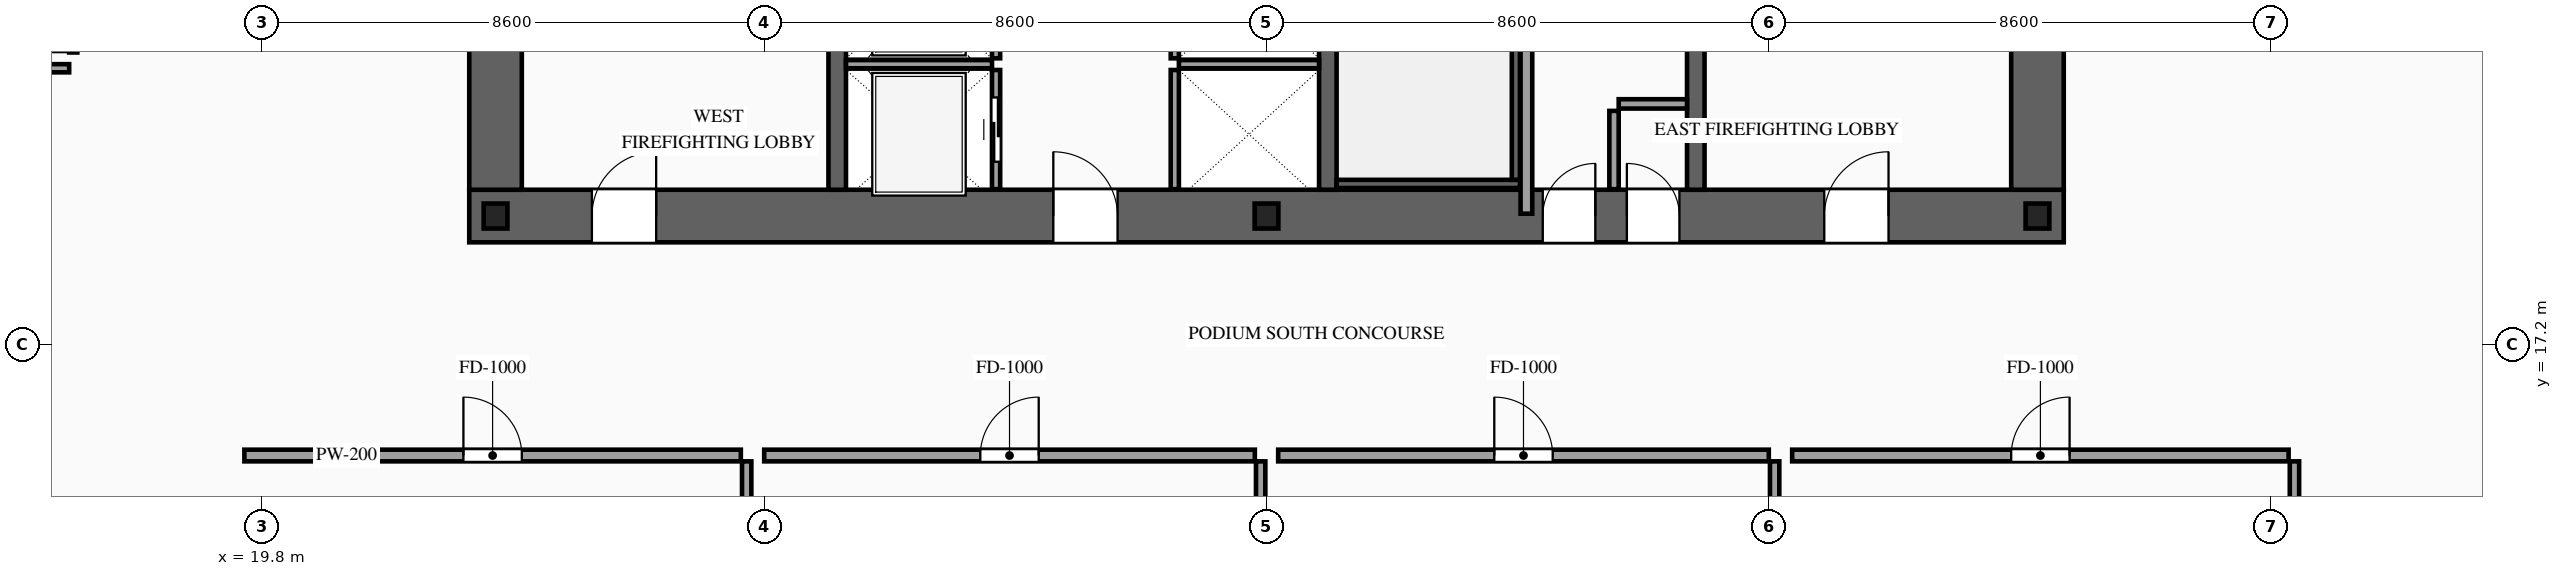
"""IFC4 building model, lengths in metres.
Left out: names, types, materials, properties, quantities, classifications, styles, units other than length and angle.
Written with IfcOpenShell. Run it as: python <this file> out.ifc"""

import sys

from ifc_helpers import new_model, si_unit, direction, frame, frame_2d, origin, origin_2d, place, context, subcontext, project, spatial, rectangle, i_section, extrude, source, transform, mapped, element, fill, save


model = new_model("IFC4")
c1 = context("Model", 3, precision=1e-05, world=origin(), true_north=direction((0.0, 1.0)))
c2 = subcontext(c1, "Body", "Model", "MODEL_VIEW")
j1 = project(units=[si_unit("LENGTHUNIT", "METRE"), si_unit("PLANEANGLEUNIT", "RADIAN")], contexts=[c1])
p1 = place(None, origin())
s1 = spatial("IfcSite", under=j1, at=p1, CompositionType="ELEMENT")
p2 = place(p1, origin())
s2 = spatial("IfcBuilding", under=s1, at=p2, CompositionType="ELEMENT")
p3 = place(p2, frame((0.0, 0.0, 25.8)))
s3 = spatial("IfcBuildingStorey", under=s2, at=p3, CompositionType="ELEMENT", Elevation=25.8)
p4 = place(p3, frame((23.35, 19.4, 0.0), z_axis=(0.0, 0.0, 1.0), x_axis=(1.0, 0.0, 0.0)))
e1 = element("IfcWall", 1, at=p4, inside=s3, PredefinedType="SHEAR", context=c2, shape_type="SweptSolid", body=[
    extrude(rectangle(XDim=27.3, YDim=0.9, at=frame_2d((13.65, 0.0))), origin(), (0.0, 0.0, 1.0), 4.8),
])
p5 = place(p4, frame((2.1, 0.0, 0.0)))
e2 = element("IfcOpeningElement", 2, at=p5, cuts=e1, PredefinedType="OPENING", context=c2, shape_type="SweptSolid", body=[
    extrude(rectangle(XDim=1.1, YDim=2.2, at=frame_2d((0.55, 1.1))), frame((0.0, 0.465, 0.0), z_axis=(0.0, -1.0, 0.0), x_axis=(1.0, 0.0, 0.0)), (0.0, 0.0, 1.0), 0.93),
])
p6 = place(p4, frame((10.0, 0.0, 0.0)))
e3 = element("IfcOpeningElement", 3, at=p6, cuts=e1, PredefinedType="OPENING", context=c2, shape_type="SweptSolid", body=[
    extrude(rectangle(XDim=1.1, YDim=2.2, at=frame_2d((0.55, 1.1))), frame((0.0, 0.465, 0.0), z_axis=(0.0, -1.0, 0.0), x_axis=(1.0, 0.0, 0.0)), (0.0, 0.0, 1.0), 0.93),
])
p7 = place(p4, frame((23.2, 0.0, 0.0)))
e4 = element("IfcOpeningElement", 4, at=p7, cuts=e1, PredefinedType="OPENING", context=c2, shape_type="SweptSolid", body=[
    extrude(rectangle(XDim=1.1, YDim=2.2, at=frame_2d((0.55, 1.1))), frame((0.0, 0.465, 0.0), z_axis=(0.0, -1.0, 0.0), x_axis=(1.0, 0.0, 0.0)), (0.0, 0.0, 1.0), 0.93),
])
p8 = place(p4, frame((19.82, 0.0, 0.0)))
e5 = element("IfcOpeningElement", 5, at=p8, cuts=e1, PredefinedType="OPENING", context=c2, shape_type="SweptSolid", body=[
    extrude(rectangle(XDim=0.9, YDim=2.15, at=frame_2d((0.45, 1.075))), frame((0.0, 0.465, 0.0), z_axis=(0.0, -1.0, 0.0), x_axis=(1.0, 0.0, 0.0)), (0.0, 0.0, 1.0), 0.93),
])
p9 = place(p4, frame((18.38, 0.0, 0.0)))
e6 = element("IfcOpeningElement", 6, at=p9, cuts=e1, PredefinedType="OPENING", context=c2, shape_type="SweptSolid", body=[
    extrude(rectangle(XDim=0.9, YDim=2.15, at=frame_2d((0.45, 1.075))), frame((0.0, 0.465, 0.0), z_axis=(0.0, -1.0, 0.0), x_axis=(1.0, 0.0, 0.0)), (0.0, 0.0, 1.0), 0.93),
])
m1 = source(origin(), c2, "Body", "SweptSolid", [
    extrude(rectangle(XDim=11.9, YDim=0.9, at=frame_2d((5.95, 0.0))), origin(), (0.0, 0.0, 1.0), 4.8),
])
for number, where, z_axis, x_axis in (
    (7, (23.8, 19.85, 0.0), (0.0, 0.0, 1.0), (0.0, 1.0, 0.0)),
    (8, (50.2, 19.85, 0.0), (0.0, 0.0, 1.0), (0.0, 1.0, 0.0)),
):
    element("IfcWall", number, at=place(p3, frame(where, z_axis=z_axis, x_axis=x_axis)), inside=s3, PredefinedType="SHEAR", context=c2, shape_type="MappedRepresentation", body=[
        mapped(m1, transform((0.0, 0.0, 0.0), scale=1.0)),
    ])
m2 = source(origin(), c2, "Body", "SweptSolid", [
    extrude(rectangle(XDim=11.9, YDim=0.3, at=frame_2d((5.95, 0.0))), origin(), (0.0, 0.0, 1.0), 4.8),
])
for number, where, z_axis, x_axis in (
    (9, (29.65, 19.85, 0.0), (0.0, 0.0, 1.0), (0.0, 1.0, 0.0)),
    (10, (38.05, 19.85, 0.0), (0.0, 0.0, 1.0), (0.0, 1.0, 0.0)),
    (11, (44.35, 19.85, 0.0), (0.0, 0.0, 1.0), (0.0, 1.0, 0.0)),
):
    element("IfcWall", number, at=place(p3, frame(where, z_axis=z_axis, x_axis=x_axis)), inside=s3, PredefinedType="SOLIDWALL", context=c2, shape_type="MappedRepresentation", body=[
        mapped(m2, transform((0.0, 0.0, 0.0), scale=1.0)),
    ])
m3 = source(origin(), c2, "Body", "SweptSolid", [
    extrude(i_section(OverallWidth=0.407, OverallDepth=0.428, WebThickness=0.02, FlangeThickness=0.035, at=origin_2d()), origin(), (0.0, 0.0, 1.0), 4.8),
])
for number, where, z_axis, x_axis in (
    (12, (23.8, 19.4, 0.0), (0.0, 0.0, 1.0), (1.0, 0.0, 0.0)),
    (13, (37.0, 19.4, 0.0), (0.0, 0.0, 1.0), (1.0, 0.0, 0.0)),
    (14, (50.2, 19.4, 0.0), (0.0, 0.0, 1.0), (1.0, 0.0, 0.0)),
):
    element("IfcColumn", number, at=place(p3, frame(where, z_axis=z_axis, x_axis=x_axis)), inside=s3, PredefinedType="COLUMN", context=c2, shape_type="MappedRepresentation", body=[
        mapped(m3, transform((0.0, 0.0, 0.0), scale=1.0)),
    ])
p10 = place(p3, frame((32.37, 19.86, 0.0), z_axis=(0.0, 0.0, 1.0), x_axis=(0.0, 1.0, 0.0)))
e15 = element("IfcWall", 15, at=p10, inside=s3, PredefinedType="SOLIDWALL", context=c2, shape_type="SweptSolid", body=[
    extrude(rectangle(XDim=2.04, YDim=0.14, at=frame_2d((1.02, 0.0))), origin(), (0.0, 0.0, 1.0), 4.5),
])
p11 = place(p10, frame((0.47, 0.0, 0.0)))
e16 = element("IfcOpeningElement", 16, at=p11, cuts=e15, PredefinedType="OPENING", context=c2, shape_type="SweptSolid", body=[
    extrude(rectangle(XDim=1.1, YDim=2.2, at=frame_2d((0.55, 1.1))), frame((0.0, 0.085, 0.0), z_axis=(0.0, -1.0, 0.0), x_axis=(1.0, 0.0, 0.0)), (0.0, 0.0, 1.0), 0.17),
])
m4 = source(origin(), c2, "Body", "SweptSolid", [
    extrude(rectangle(XDim=2.5, YDim=0.14, at=frame_2d((1.25, 0.0))), origin(), (0.0, 0.0, 1.0), 4.5),
])
p12 = place(p3, frame((29.8, 22.0, 0.0), z_axis=(0.0, 0.0, 1.0), x_axis=(1.0, 0.0, 0.0)))
e17 = element("IfcWall", 17, at=p12, inside=s3, PredefinedType="SOLIDWALL", context=c2, shape_type="MappedRepresentation", body=[
    mapped(m4, transform((0.0, 0.0, 0.0), scale=1.0)),
])
p13 = place(p3, frame((32.37, 22.1, 0.0), z_axis=(0.0, 0.0, 1.0), x_axis=(0.0, 1.0, 0.0)))
e18 = element("IfcWall", 18, at=p13, inside=s3, PredefinedType="SOLIDWALL", context=c2, shape_type="SweptSolid", body=[
    extrude(rectangle(XDim=2.2, YDim=0.14, at=frame_2d((1.1, 0.0))), origin(), (0.0, 0.0, 1.0), 4.5),
])
p14 = place(p13, frame((0.55, 0.0, 0.0)))
e19 = element("IfcOpeningElement", 19, at=p14, cuts=e18, PredefinedType="OPENING", context=c2, shape_type="SweptSolid", body=[
    extrude(rectangle(XDim=1.1, YDim=2.2, at=frame_2d((0.55, 1.1))), frame((0.0, 0.085, 0.0), z_axis=(0.0, -1.0, 0.0), x_axis=(1.0, 0.0, 0.0)), (0.0, 0.0, 1.0), 0.17),
])
m5 = source(origin(), c2, "Body", "SweptSolid", [
    extrude(rectangle(XDim=2.04, YDim=0.14, at=frame_2d((1.02, 0.0))), origin(), (0.0, 0.0, 1.0), 4.5),
])
p15 = place(p3, frame((35.43, 19.86, 0.0), z_axis=(0.0, 0.0, 1.0), x_axis=(0.0, 1.0, 0.0)))
e20 = element("IfcWall", 20, at=p15, inside=s3, PredefinedType="SOLIDWALL", context=c2, shape_type="MappedRepresentation", body=[
    mapped(m5, transform((0.0, 0.0, 0.0), scale=1.0)),
])
m6 = source(origin(), c2, "Body", "SweptSolid", [
    extrude(rectangle(XDim=2.4, YDim=0.14, at=frame_2d((1.2, 0.0))), origin(), (0.0, 0.0, 1.0), 4.5),
])
p16 = place(p3, frame((35.5, 22.0, 0.0), z_axis=(0.0, 0.0, 1.0), x_axis=(1.0, 0.0, 0.0)))
e21 = element("IfcWall", 21, at=p16, inside=s3, PredefinedType="SOLIDWALL", context=c2, shape_type="MappedRepresentation", body=[
    mapped(m6, transform((0.0, 0.0, 0.0), scale=1.0)),
])
m7 = source(origin(), c2, "Body", "SweptSolid", [
    extrude(rectangle(XDim=2.2, YDim=0.14, at=frame_2d((1.1, 0.0))), origin(), (0.0, 0.0, 1.0), 4.5),
])
p17 = place(p3, frame((35.43, 22.1, 0.0), z_axis=(0.0, 0.0, 1.0), x_axis=(0.0, 1.0, 0.0)))
e22 = element("IfcWall", 22, at=p17, inside=s3, PredefinedType="SOLIDWALL", context=c2, shape_type="MappedRepresentation", body=[
    mapped(m7, transform((0.0, 0.0, 0.0), scale=1.0)),
])
m8 = source(origin(), c2, "Body", "SweptSolid", [
    extrude(rectangle(XDim=2.3, YDim=0.14, at=frame_2d((1.15, 0.0))), origin(), (0.0, 0.0, 1.0), 4.5),
])
p18 = place(p3, frame((14.2, 21.93, 0.0), z_axis=(0.0, 0.0, 1.0), x_axis=(1.0, 0.0, 0.0)))
e23 = element("IfcWall", 23, at=p18, inside=s3, PredefinedType="SOLIDWALL", context=c2, shape_type="MappedRepresentation", body=[
    mapped(m8, transform((0.0, 0.0, 0.0), scale=1.0)),
])
m9 = source(origin(), c2, "Body", "SweptSolid", [
    extrude(rectangle(XDim=3.14, YDim=0.14, at=frame_2d((1.57, 0.0))), origin(), (0.0, 0.0, 1.0), 4.5),
])
p19 = place(p3, frame((38.2, 19.95, 0.0), z_axis=(0.0, 0.0, 1.0), x_axis=(1.0, 0.0, 0.0)))
e24 = element("IfcWall", 24, at=p19, inside=s3, PredefinedType="SOLIDWALL", context=c2, shape_type="MappedRepresentation", body=[
    mapped(m9, transform((0.0, 0.0, 0.0), scale=1.0)),
])
m10 = source(origin(), c2, "Body", "SweptSolid", [
    extrude(rectangle(XDim=8.94, YDim=0.14, at=frame_2d((4.47, 0.0))), origin(), (0.0, 0.0, 1.0), 4.5),
])
p20 = place(p3, frame((41.27, 20.02, 0.0), z_axis=(0.0, 0.0, 1.0), x_axis=(0.0, 1.0, 0.0)))
e25 = element("IfcWall", 25, at=p20, inside=s3, PredefinedType="SOLIDWALL", context=c2, shape_type="MappedRepresentation", body=[
    mapped(m10, transform((0.0, 0.0, 0.0), scale=1.0)),
])
m11 = source(origin(), c2, "Body", "SweptSolid", [
    extrude(rectangle(XDim=1.34, YDim=0.16, at=frame_2d((0.67, 0.0))), origin(), (0.0, 0.0, 1.0), 4.5),
])
p21 = place(p3, frame((42.95, 19.86, 0.0), z_axis=(0.0, 0.0, 1.0), x_axis=(0.0, 1.0, 0.0)))
e26 = element("IfcWall", 26, at=p21, inside=s3, PredefinedType="PARTITIONING", context=c2, shape_type="MappedRepresentation", body=[
    mapped(m11, transform((0.0, 0.0, 0.0), scale=1.0)),
])
m12 = source(origin(), c2, "Body", "SweptSolid", [
    extrude(rectangle(XDim=1.17, YDim=0.16, at=frame_2d((0.585, 0.0))), origin(), (0.0, 0.0, 1.0), 4.5),
])
p22 = place(p3, frame((43.03, 21.32, 0.0), z_axis=(0.0, 0.0, 1.0), x_axis=(1.0, 0.0, 0.0)))
e27 = element("IfcWall", 27, at=p22, inside=s3, PredefinedType="PARTITIONING", context=c2, shape_type="MappedRepresentation", body=[
    mapped(m12, transform((0.0, 0.0, 0.0), scale=1.0)),
])
m13 = source(origin(), c2, "Body", "SweptSolid", [
    extrude(rectangle(XDim=6.51, YDim=0.2, at=frame_2d((3.255, 0.0))), origin(), (0.0, 0.0, 1.0), 4.5),
])
p23 = place(p3, frame((41.45, 19.44, 0.0), z_axis=(0.0, 0.0, 1.0), x_axis=(0.0, 1.0, 0.0)))
e28 = element("IfcWall", 28, at=p23, inside=s3, PredefinedType="PARTITIONING", context=c2, shape_type="MappedRepresentation", body=[
    mapped(m13, transform((0.0, 0.0, 0.0), scale=1.0)),
])
p24 = place(p3, frame((19.5, 15.3, 0.0), z_axis=(0.0, 0.0, 1.0), x_axis=(1.0, 0.0, 0.0)))
e29 = element("IfcWall", 29, at=p24, inside=s3, PredefinedType="PARTITIONING", context=c2, shape_type="SweptSolid", body=[
    extrude(rectangle(XDim=8.5, YDim=0.2, at=frame_2d((4.25, 0.0))), origin(), (0.0, 0.0, 1.0), 4.5),
])
p25 = place(p24, frame((3.75, 0.0, 0.0)))
e30 = element("IfcOpeningElement", 30, at=p25, cuts=e29, PredefinedType="OPENING", context=c2, shape_type="SweptSolid", body=[
    extrude(rectangle(XDim=1.0, YDim=2.2, at=frame_2d((0.5, 1.1))), frame((0.0, 0.115, 0.0), z_axis=(0.0, -1.0, 0.0), x_axis=(1.0, 0.0, 0.0)), (0.0, 0.0, 1.0), 0.23),
])
m14 = source(origin(), c2, "Body", "SweptSolid", [
    extrude(rectangle(XDim=13.22, YDim=0.16, at=frame_2d((6.61, 0.0))), origin(), (0.0, 0.0, 1.0), 4.5),
])
p26 = place(p3, frame((28.1, 1.98, 0.0), z_axis=(0.0, 0.0, 1.0), x_axis=(0.0, 1.0, 0.0)))
e31 = element("IfcWall", 31, at=p26, inside=s3, PredefinedType="PARTITIONING", context=c2, shape_type="MappedRepresentation", body=[
    mapped(m14, transform((0.0, 0.0, 0.0), scale=1.0)),
])
p27 = place(p3, frame((28.4, 15.3, 0.0), z_axis=(0.0, 0.0, 1.0), x_axis=(1.0, 0.0, 0.0)))
e32 = element("IfcWall", 32, at=p27, inside=s3, PredefinedType="PARTITIONING", context=c2, shape_type="SweptSolid", body=[
    extrude(rectangle(XDim=8.4, YDim=0.2, at=frame_2d((4.2, 0.0))), origin(), (0.0, 0.0, 1.0), 4.5),
])
p28 = place(p27, frame((3.7, 0.0, 0.0)))
e33 = element("IfcOpeningElement", 33, at=p28, cuts=e32, PredefinedType="OPENING", context=c2, shape_type="SweptSolid", body=[
    extrude(rectangle(XDim=1.0, YDim=2.2, at=frame_2d((0.5, 1.1))), frame((0.0, 0.115, 0.0), z_axis=(0.0, -1.0, 0.0), x_axis=(1.0, 0.0, 0.0)), (0.0, 0.0, 1.0), 0.23),
])
m15 = source(origin(), c2, "Body", "SweptSolid", [
    extrude(rectangle(XDim=13.22, YDim=0.16, at=frame_2d((6.61, 0.0))), origin(), (0.0, 0.0, 1.0), 3.095),
])
p29 = place(p3, frame((36.9, 1.98, 0.0), z_axis=(0.0, 0.0, 1.0), x_axis=(0.0, 1.0, 0.0)))
e34 = element("IfcWall", 34, at=p29, inside=s3, PredefinedType="PARTITIONING", context=c2, shape_type="MappedRepresentation", body=[
    mapped(m15, transform((0.0, 0.0, 0.0), scale=1.0)),
])
p30 = place(p3, frame((37.2, 15.3, 0.0), z_axis=(0.0, 0.0, 1.0), x_axis=(1.0, 0.0, 0.0)))
e35 = element("IfcWall", 35, at=p30, inside=s3, PredefinedType="PARTITIONING", context=c2, shape_type="SweptSolid", body=[
    extrude(rectangle(XDim=8.4, YDim=0.2, at=frame_2d((4.2, 0.0))), origin(), (0.0, 0.0, 1.0), 4.5),
])
p31 = place(p30, frame((3.7, 0.0, 0.0)))
e36 = element("IfcOpeningElement", 36, at=p31, cuts=e35, PredefinedType="OPENING", context=c2, shape_type="SweptSolid", body=[
    extrude(rectangle(XDim=1.0, YDim=2.2, at=frame_2d((0.5, 1.1))), frame((0.0, 0.115, 0.0), z_axis=(0.0, -1.0, 0.0), x_axis=(1.0, 0.0, 0.0)), (0.0, 0.0, 1.0), 0.23),
])
p32 = place(p3, frame((45.7, 1.98, 0.0), z_axis=(0.0, 0.0, 1.0), x_axis=(0.0, 1.0, 0.0)))
e37 = element("IfcWall", 37, at=p32, inside=s3, PredefinedType="PARTITIONING", context=c2, shape_type="MappedRepresentation", body=[
    mapped(m14, transform((0.0, 0.0, 0.0), scale=1.0)),
])
p33 = place(p3, frame((46.0, 15.3, 0.0), z_axis=(0.0, 0.0, 1.0), x_axis=(1.0, 0.0, 0.0)))
e38 = element("IfcWall", 38, at=p33, inside=s3, PredefinedType="PARTITIONING", context=c2, shape_type="SweptSolid", body=[
    extrude(rectangle(XDim=8.5, YDim=0.2, at=frame_2d((4.25, 0.0))), origin(), (0.0, 0.0, 1.0), 4.5),
])
p34 = place(p33, frame((3.75, 0.0, 0.0)))
e39 = element("IfcOpeningElement", 39, at=p34, cuts=e38, PredefinedType="OPENING", context=c2, shape_type="SweptSolid", body=[
    extrude(rectangle(XDim=1.0, YDim=2.2, at=frame_2d((0.5, 1.1))), frame((0.0, 0.115, 0.0), z_axis=(0.0, -1.0, 0.0), x_axis=(1.0, 0.0, 0.0)), (0.0, 0.0, 1.0), 0.23),
])
p35 = place(p3, frame((54.6, 1.98, 0.0), z_axis=(0.0, 0.0, 1.0), x_axis=(0.0, 1.0, 0.0)))
e40 = element("IfcWall", 40, at=p35, inside=s3, PredefinedType="PARTITIONING", context=c2, shape_type="MappedRepresentation", body=[
    mapped(m14, transform((0.0, 0.0, 0.0), scale=1.0)),
])
m16 = source(origin(), c2, "Body", "SweptSolid", [
    extrude(rectangle(XDim=1.1, YDim=2.2, at=frame_2d((0.55, 1.1))), frame((0.0, 0.025, 0.0), z_axis=(0.0, -1.0, 0.0), x_axis=(1.0, 0.0, 0.0)), (0.0, 0.0, 1.0), 0.05),
])
p36 = place(p11, origin())
e41 = element("IfcDoor", 41, at=p36, inside=s3, OperationType="SLIDING_TO_LEFT", PredefinedType="DOOR", context=c2, shape_type="MappedRepresentation", body=[
    mapped(m16, transform((0.0, 0.0, 0.0), scale=1.0)),
])
fill(e16, e41)
m17 = source(origin(), c2, "Body", "SweptSolid", [
    extrude(rectangle(XDim=1.1, YDim=2.2, at=frame_2d((0.55, 1.1))), frame((0.0, 0.025, 0.0), z_axis=(0.0, -1.0, 0.0), x_axis=(1.0, 0.0, 0.0)), (0.0, 0.0, 1.0), 0.05),
])
p37 = place(p5, origin())
e42 = element("IfcDoor", 42, at=p37, inside=s3, OperationType="SINGLE_SWING_RIGHT", PredefinedType="DOOR", context=c2, shape_type="MappedRepresentation", body=[
    mapped(m17, transform((0.0, 0.0, 0.0), scale=1.0)),
])
fill(e2, e42)
p38 = place(p6, origin())
e43 = element("IfcDoor", 43, at=p38, inside=s3, OperationType="SINGLE_SWING_LEFT", PredefinedType="DOOR", context=c2, shape_type="MappedRepresentation", body=[
    mapped(m17, transform((0.0, 0.0, 0.0), scale=1.0)),
])
fill(e3, e43)
p39 = place(p7, origin())
e44 = element("IfcDoor", 44, at=p39, inside=s3, OperationType="SINGLE_SWING_RIGHT", PredefinedType="DOOR", context=c2, shape_type="MappedRepresentation", body=[
    mapped(m17, transform((0.0, 0.0, 0.0), scale=1.0)),
])
fill(e4, e44)
m18 = source(origin(), c2, "Body", "SweptSolid", [
    extrude(rectangle(XDim=0.9, YDim=2.15, at=frame_2d((0.45, 1.075))), frame((0.0, 0.025, 0.0), z_axis=(0.0, -1.0, 0.0), x_axis=(1.0, 0.0, 0.0)), (0.0, 0.0, 1.0), 0.05),
])
p40 = place(p8, origin())
e45 = element("IfcDoor", 45, at=p40, inside=s3, OperationType="SINGLE_SWING_LEFT", PredefinedType="DOOR", context=c2, shape_type="MappedRepresentation", body=[
    mapped(m18, transform((0.0, 0.0, 0.0), scale=1.0)),
])
fill(e5, e45)
p41 = place(p9, origin())
e46 = element("IfcDoor", 46, at=p41, inside=s3, OperationType="SINGLE_SWING_RIGHT", PredefinedType="DOOR", context=c2, shape_type="MappedRepresentation", body=[
    mapped(m18, transform((0.0, 0.0, 0.0), scale=1.0)),
])
fill(e6, e46)
m19 = source(origin(), c2, "Body", "SweptSolid", [
    extrude(rectangle(XDim=1.0, YDim=2.2, at=frame_2d((0.5, 1.1))), frame((0.0, 0.025, 0.0), z_axis=(0.0, -1.0, 0.0), x_axis=(1.0, 0.0, 0.0)), (0.0, 0.0, 1.0), 0.05),
])
p42 = place(p25, origin())
e47 = element("IfcDoor", 47, at=p42, inside=s3, OperationType="SINGLE_SWING_LEFT", PredefinedType="DOOR", context=c2, shape_type="MappedRepresentation", body=[
    mapped(m19, transform((0.0, 0.0, 0.0), scale=1.0)),
])
fill(e30, e47)
p43 = place(p28, origin())
e48 = element("IfcDoor", 48, at=p43, inside=s3, OperationType="SINGLE_SWING_RIGHT", PredefinedType="DOOR", context=c2, shape_type="MappedRepresentation", body=[
    mapped(m19, transform((0.0, 0.0, 0.0), scale=1.0)),
])
fill(e33, e48)
p44 = place(p31, origin())
e49 = element("IfcDoor", 49, at=p44, inside=s3, OperationType="SINGLE_SWING_LEFT", PredefinedType="DOOR", context=c2, shape_type="MappedRepresentation", body=[
    mapped(m19, transform((0.0, 0.0, 0.0), scale=1.0)),
])
fill(e36, e49)
p45 = place(p34, origin())
e50 = element("IfcDoor", 50, at=p45, inside=s3, OperationType="SINGLE_SWING_RIGHT", PredefinedType="DOOR", context=c2, shape_type="MappedRepresentation", body=[
    mapped(m19, transform((0.0, 0.0, 0.0), scale=1.0)),
])
fill(e39, e50)
save(model, sys.argv[1])
